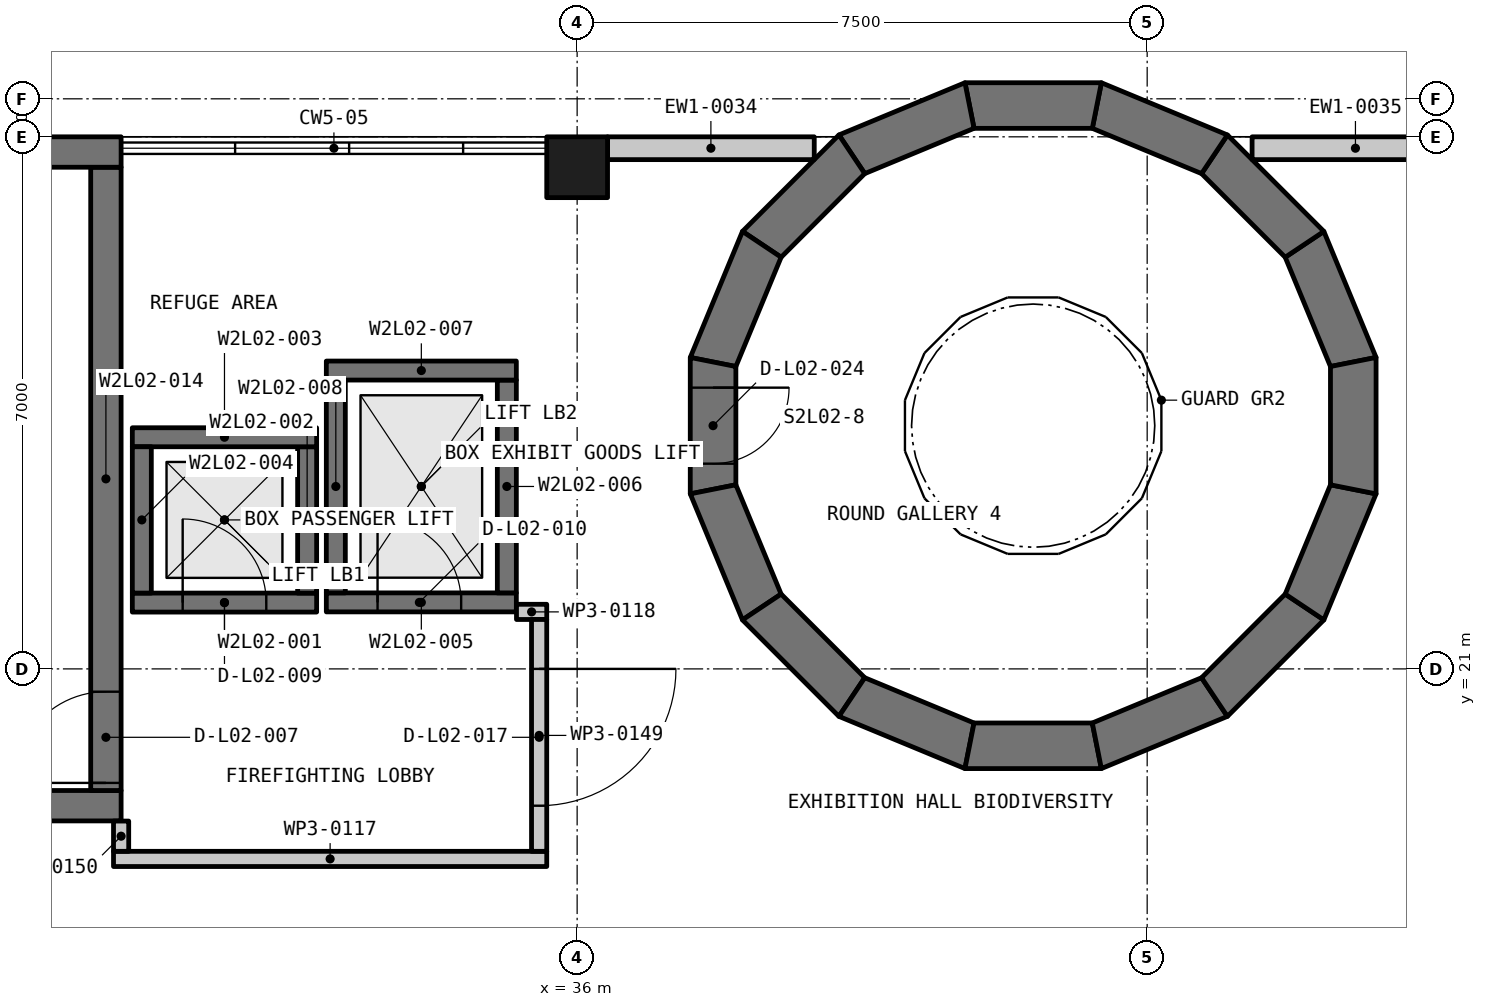
"""IFC4 building model, lengths in metres.
Left out: names, types, materials, properties, quantities, classifications, styles, units other than length and angle.
Written with IfcOpenShell. Run it as: python <this file> out.ifc"""

import sys

from ifc_helpers import new_model, si_unit, direction, frame, frame_2d, origin, origin_2d, place, context, subcontext, project, spatial, polyline, rectangle, outline, extrude, element, fill, save


model = new_model("IFC4")
c1 = context("Model", 3, precision=1e-05, world=origin(), true_north=direction((0.0, 1.0)))
c2 = subcontext(c1, "Body", "Model", "MODEL_VIEW")
j1 = project(units=[si_unit("LENGTHUNIT", "METRE"), si_unit("PLANEANGLEUNIT", "RADIAN")], contexts=[c1])
p1 = place(None, origin())
s1 = spatial("IfcSite", under=j1, at=p1, CompositionType="ELEMENT")
p2 = place(p1, origin())
s2 = spatial("IfcBuilding", under=s1, at=p2, CompositionType="ELEMENT")
p3 = place(p2, frame((0.0, 0.0, 11.25)))
s3 = spatial("IfcBuildingStorey", under=s2, at=p3, CompositionType="ELEMENT", Elevation=11.25)
p4 = place(p3, frame((36.0, 27.6, -0.3), z_axis=(0.0, 0.0, 1.0), x_axis=(1.0, 0.0, 0.0)))
e1 = element("IfcColumn", 1, at=p4, inside=s3, PredefinedType="COLUMN", context=c2, shape_type="SweptSolid", body=[
    extrude(rectangle(XDim=0.8, YDim=0.8, at=origin_2d()), origin(), (0.0, 0.0, 1.0), 4.16),
])
p5 = place(p3, frame((46.234, 24.983, -0.3), z_axis=(0.0, 0.0, 1.0), x_axis=(-0.3826441282, 0.92389581185, 0.0)))
e2 = element("IfcWall", 2, at=p5, inside=s3, PredefinedType="SHEAR", context=c2, shape_type="SweptSolid", body=[
    extrude(outline(polyline([(0.0, -0.3), (1.795, -0.3), (1.675, 0.3), (0.119, 0.3), (0.0, -0.3)])), origin(), (0.0, 0.0, 1.0), 4.5),
])
p6 = place(p3, frame((45.613, 26.543, -0.3), z_axis=(0.0, 0.0, 1.0), x_axis=(-0.707038767261, 0.707174788571, 0.0)))
e3 = element("IfcWall", 3, at=p6, inside=s3, PredefinedType="SHEAR", context=c2, shape_type="SweptSolid", body=[
    extrude(outline(polyline([(0.0, -0.3), (1.795, -0.3), (1.675, 0.3), (0.119, 0.3), (0.0, -0.3)])), origin(), (0.0, 0.0, 1.0), 4.5),
])
p7 = place(p3, frame((44.441, 27.748, -0.3), z_axis=(0.0, 0.0, 1.0), x_axis=(-0.923847718321, 0.382760229587, 0.0)))
e4 = element("IfcWall", 4, at=p7, inside=s3, PredefinedType="SHEAR", context=c2, shape_type="SweptSolid", body=[
    extrude(outline(polyline([(0.0, -0.3), (1.795, -0.3), (1.676, 0.3), (0.119, 0.3), (0.0, -0.3)])), origin(), (0.0, 0.0, 1.0), 4.5),
])
p8 = place(p3, frame((42.897, 28.412, -0.3), z_axis=(0.0, 0.0, 1.0), x_axis=(-1.0, 0.0, 0.0)))
e5 = element("IfcWall", 5, at=p8, inside=s3, PredefinedType="SHEAR", context=c2, shape_type="SweptSolid", body=[
    extrude(outline(polyline([(0.0, -0.3), (1.795, -0.3), (1.676, 0.3), (0.119, 0.3), (0.0, -0.3)])), origin(), (0.0, 0.0, 1.0), 4.5),
])
p9 = place(p3, frame((41.217, 28.435, -0.3), z_axis=(0.0, 0.0, 1.0), x_axis=(-0.923847718321, -0.382760229587, 0.0)))
e6 = element("IfcWall", 6, at=p9, inside=s3, PredefinedType="SHEAR", context=c2, shape_type="SweptSolid", body=[
    extrude(outline(polyline([(0.0, -0.3), (1.795, -0.3), (1.676, 0.3), (0.119, 0.3), (0.0, -0.3)])), origin(), (0.0, 0.0, 1.0), 4.5),
])
p10 = place(p3, frame((39.656, 27.813, -0.3), z_axis=(0.0, 0.0, 1.0), x_axis=(-0.707038767261, -0.707174788571, 0.0)))
e7 = element("IfcWall", 7, at=p10, inside=s3, PredefinedType="SHEAR", context=c2, shape_type="SweptSolid", body=[
    extrude(outline(polyline([(0.0, -0.3), (1.795, -0.3), (1.676, 0.3), (0.119, 0.3), (0.0, -0.3)])), origin(), (0.0, 0.0, 1.0), 4.5),
])
p11 = place(p3, frame((38.452, 26.641, -0.3), z_axis=(0.0, 0.0, 1.0), x_axis=(-0.3826441282, -0.92389581185, 0.0)))
e8 = element("IfcWall", 8, at=p11, inside=s3, PredefinedType="SHEAR", context=c2, shape_type="SweptSolid", body=[
    extrude(outline(polyline([(0.0, -0.3), (1.795, -0.3), (1.676, 0.3), (0.119, 0.3), (0.0, -0.3)])), origin(), (0.0, 0.0, 1.0), 4.5),
])
p12 = place(p3, frame((37.788, 25.097, -0.3), z_axis=(0.0, 0.0, 1.0), x_axis=(0.0, -1.0, 0.0)))
e9 = element("IfcWall", 9, at=p12, inside=s3, PredefinedType="SHEAR", context=c2, shape_type="SweptSolid", body=[
    extrude(outline(polyline([(0.0, -0.3), (1.795, -0.3), (1.676, 0.3), (0.119, 0.3), (0.0, -0.3)])), origin(), (0.0, 0.0, 1.0), 4.5),
])
p13 = place(p12, frame((0.397, 0.0, 0.3)))
e10 = element("IfcOpeningElement", 10, at=p13, cuts=e9, PredefinedType="OPENING", context=c2, shape_type="SweptSolid", body=[
    extrude(rectangle(XDim=1.0, YDim=2.2, at=frame_2d((0.5, 1.1))), frame((0.0, 0.31, 0.0), z_axis=(0.0, -1.0, 0.0), x_axis=(1.0, 0.0, 0.0)), (0.0, 0.0, 1.0), 0.62),
])
p14 = place(p3, frame((37.766, 23.417, -0.3), z_axis=(0.0, 0.0, 1.0), x_axis=(0.3826441282, -0.92389581185, 0.0)))
e11 = element("IfcWall", 11, at=p14, inside=s3, PredefinedType="SHEAR", context=c2, shape_type="SweptSolid", body=[
    extrude(outline(polyline([(0.0, -0.3), (1.795, -0.3), (1.676, 0.3), (0.119, 0.3), (0.0, -0.3)])), origin(), (0.0, 0.0, 1.0), 4.5),
])
p15 = place(p3, frame((38.387, 21.856, -0.3), z_axis=(0.0, 0.0, 1.0), x_axis=(0.707106781187, -0.707106781187, 0.0)))
e12 = element("IfcWall", 12, at=p15, inside=s3, PredefinedType="SHEAR", context=c2, shape_type="SweptSolid", body=[
    extrude(outline(polyline([(0.0, -0.3), (1.795, -0.3), (1.675, 0.3), (0.119, 0.3), (0.0, -0.3)])), origin(), (0.0, 0.0, 1.0), 4.5),
])
for number, where, z_axis, x_axis in (
    (13, (39.559, 20.652, -0.3), (0.0, 0.0, 1.0), (0.924, -0.383, 0.0)),
    (14, (41.103, 19.988, -0.3), (0.0, 0.0, 1.0), (1.0, 0.0, 0.0)),
):
    element("IfcWall", number, at=place(p3, frame(where, z_axis=z_axis, x_axis=x_axis)), inside=s3, PredefinedType="SHEAR", context=c2, shape_type="SweptSolid", body=[
        extrude(outline(polyline([(0.0, -0.3), (1.795, -0.3), (1.676, 0.3), (0.119, 0.3), (0.0, -0.3)])), origin(), (0.0, 0.0, 1.0), 4.5),
    ])
p16 = place(p3, frame((42.783, 19.966, -0.3), z_axis=(0.0, 0.0, 1.0), x_axis=(0.92389581185, 0.3826441282, 0.0)))
e15 = element("IfcWall", 15, at=p16, inside=s3, PredefinedType="SHEAR", context=c2, shape_type="SweptSolid", body=[
    extrude(outline(polyline([(0.0, -0.3), (1.795, -0.3), (1.675, 0.3), (0.119, 0.3), (0.0, -0.3)])), origin(), (0.0, 0.0, 1.0), 4.5),
])
p17 = place(p3, frame((44.344, 20.587, -0.3), z_axis=(0.0, 0.0, 1.0), x_axis=(0.707106781187, 0.707106781187, 0.0)))
e16 = element("IfcWall", 16, at=p17, inside=s3, PredefinedType="SHEAR", context=c2, shape_type="SweptSolid", body=[
    extrude(outline(polyline([(0.0, -0.3), (1.795, -0.3), (1.675, 0.3), (0.119, 0.3), (0.0, -0.3)])), origin(), (0.0, 0.0, 1.0), 4.5),
])
p18 = place(p3, frame((45.548, 21.759, -0.3), z_axis=(0.0, 0.0, 1.0), x_axis=(0.3826441282, 0.92389581185, 0.0)))
e17 = element("IfcWall", 17, at=p18, inside=s3, PredefinedType="SHEAR", context=c2, shape_type="SweptSolid", body=[
    extrude(outline(polyline([(-0.0, -0.3), (1.795, -0.3), (1.675, 0.3), (0.119, 0.3), (-0.0, -0.3)])), origin(), (0.0, 0.0, 1.0), 4.5),
])
p19 = place(p3, frame((46.212, 23.302, -0.3), z_axis=(0.0, 0.0, 1.0), x_axis=(0.0, 1.0, 0.0)))
e18 = element("IfcWall", 18, at=p19, inside=s3, PredefinedType="SHEAR", context=c2, shape_type="SweptSolid", body=[
    extrude(outline(polyline([(0.0, -0.3), (1.795, -0.3), (1.676, 0.3), (0.119, 0.3), (0.0, -0.3)])), origin(), (0.0, 0.0, 1.0), 4.5),
])
p20 = place(p3, frame((30.147, 21.873, -0.3), z_axis=(0.0, 0.0, 1.0), x_axis=(1.0, 0.0, 0.0)))
e19 = element("IfcWall", 19, at=p20, inside=s3, PredefinedType="SHEAR", context=c2, shape_type="SweptSolid", body=[
    extrude(rectangle(XDim=2.425, YDim=0.25, at=frame_2d((1.212, 0.0))), origin(), (0.0, 0.0, 1.0), 4.5),
])
p21 = place(p20, frame((0.663, 0.0, 0.3)))
e20 = element("IfcOpeningElement", 20, at=p21, cuts=e19, PredefinedType="OPENING", context=c2, shape_type="SweptSolid", body=[
    extrude(rectangle(XDim=1.1, YDim=2.1, at=frame_2d((0.55, 1.05))), frame((0.0, 0.135, 0.0), z_axis=(0.0, -1.0, 0.0), x_axis=(1.0, 0.0, 0.0)), (0.0, 0.0, 1.0), 0.27),
])
p22 = place(p3, frame((32.448, 21.998, -0.3), z_axis=(0.0, 0.0, 1.0), x_axis=(0.0, 1.0, 0.0)))
e21 = element("IfcWall", 21, at=p22, inside=s3, PredefinedType="SHEAR", context=c2, shape_type="SweptSolid", body=[
    extrude(rectangle(XDim=1.925, YDim=0.25, at=frame_2d((0.962, 0.0))), origin(), (0.0, 0.0, 1.0), 4.5),
])
p23 = place(p3, frame((30.147, 24.048, -0.3), z_axis=(0.0, 0.0, 1.0), x_axis=(1.0, 0.0, 0.0)))
e22 = element("IfcWall", 22, at=p23, inside=s3, PredefinedType="SHEAR", context=c2, shape_type="SweptSolid", body=[
    extrude(rectangle(XDim=2.425, YDim=0.25, at=frame_2d((1.212, 0.0))), origin(), (0.0, 0.0, 1.0), 4.5),
])
p24 = place(p3, frame((30.272, 21.998, -0.3), z_axis=(0.0, 0.0, 1.0), x_axis=(0.0, 1.0, 0.0)))
e23 = element("IfcWall", 23, at=p24, inside=s3, PredefinedType="SHEAR", context=c2, shape_type="SweptSolid", body=[
    extrude(rectangle(XDim=1.925, YDim=0.25, at=frame_2d((0.962, 0.0))), origin(), (0.0, 0.0, 1.0), 4.5),
])
p25 = place(p3, frame((32.7, 21.875, -0.3), z_axis=(0.0, 0.0, 1.0), x_axis=(1.0, 0.0, 0.0)))
e24 = element("IfcWall", 24, at=p25, inside=s3, PredefinedType="SHEAR", context=c2, shape_type="SweptSolid", body=[
    extrude(rectangle(XDim=2.5, YDim=0.25, at=frame_2d((1.25, 0.0))), origin(), (0.0, 0.0, 1.0), 4.5),
])
p26 = place(p25, frame((0.674, 0.0, 0.3)))
e25 = element("IfcOpeningElement", 25, at=p26, cuts=e24, PredefinedType="OPENING", context=c2, shape_type="SweptSolid", body=[
    extrude(rectangle(XDim=1.1, YDim=2.1, at=frame_2d((0.55, 1.05))), frame((0.0, 0.135, 0.0), z_axis=(0.0, -1.0, 0.0), x_axis=(1.0, 0.0, 0.0)), (0.0, 0.0, 1.0), 0.27),
])
p27 = place(p3, frame((35.075, 22.0, -0.3), z_axis=(0.0, 0.0, 1.0), x_axis=(0.0, 1.0, 0.0)))
e26 = element("IfcWall", 26, at=p27, inside=s3, PredefinedType="SHEAR", context=c2, shape_type="SweptSolid", body=[
    extrude(rectangle(XDim=2.8, YDim=0.25, at=frame_2d((1.4, 0.0))), origin(), (0.0, 0.0, 1.0), 4.5),
])
p28 = place(p3, frame((32.7, 24.925, -0.3), z_axis=(0.0, 0.0, 1.0), x_axis=(1.0, 0.0, 0.0)))
e27 = element("IfcWall", 27, at=p28, inside=s3, PredefinedType="SHEAR", context=c2, shape_type="SweptSolid", body=[
    extrude(rectangle(XDim=2.5, YDim=0.25, at=frame_2d((1.25, 0.0))), origin(), (0.0, 0.0, 1.0), 4.5),
])
p29 = place(p3, frame((32.825, 22.0, -0.3), z_axis=(0.0, 0.0, 1.0), x_axis=(0.0, 1.0, 0.0)))
e28 = element("IfcWall", 28, at=p29, inside=s3, PredefinedType="SHEAR", context=c2, shape_type="SweptSolid", body=[
    extrude(rectangle(XDim=2.8, YDim=0.25, at=frame_2d((1.4, 0.0))), origin(), (0.0, 0.0, 1.0), 4.5),
])
p30 = place(p3, frame((24.5, 19.2, -0.3), z_axis=(0.0, 0.0, 1.0), x_axis=(1.0, 0.0, 0.0)))
e29 = element("IfcWall", 29, at=p30, inside=s3, PredefinedType="SHEAR", context=c2, shape_type="SweptSolid", body=[
    extrude(rectangle(XDim=5.5, YDim=0.4, at=frame_2d((2.75, 0.0))), origin(), (0.0, 0.0, 1.0), 4.5),
])
p31 = place(p3, frame((29.8, 19.4, -0.3), z_axis=(0.0, 0.0, 1.0), x_axis=(0.0, 1.0, 0.0)))
e30 = element("IfcWall", 30, at=p31, inside=s3, PredefinedType="SHEAR", context=c2, shape_type="SweptSolid", body=[
    extrude(rectangle(XDim=8.2, YDim=0.4, at=frame_2d((4.1, 0.0))), origin(), (0.0, 0.0, 1.0), 4.5),
])
p32 = place(p31, frame((0.1, 0.0, 0.3)))
e31 = element("IfcOpeningElement", 31, at=p32, cuts=e30, PredefinedType="OPENING", context=c2, shape_type="SweptSolid", body=[
    extrude(rectangle(XDim=1.2, YDim=2.2, at=frame_2d((0.6, 1.1))), frame((0.0, 0.21, 0.0), z_axis=(0.0, -1.0, 0.0), x_axis=(1.0, 0.0, 0.0)), (0.0, 0.0, 1.0), 0.42),
])
p33 = place(p3, frame((24.5, 27.8, -0.3), z_axis=(0.0, 0.0, 1.0), x_axis=(1.0, 0.0, 0.0)))
e32 = element("IfcWall", 32, at=p33, inside=s3, PredefinedType="SHEAR", context=c2, shape_type="SweptSolid", body=[
    extrude(rectangle(XDim=5.5, YDim=0.4, at=frame_2d((2.75, 0.0))), origin(), (0.0, 0.0, 1.0), 4.5),
])
for number, where, z_axis, x_axis in (
    (33, (36.4, 27.85, 0.0), (0.0, 0.0, 1.0), (1.0, 0.0, 0.0)),
    (34, (44.88, 27.85, 0.0), (0.0, 0.0, 1.0), (1.0, 0.0, 0.0)),
):
    element("IfcWall", number, at=place(p3, frame(where, z_axis=z_axis, x_axis=x_axis)), inside=s3, PredefinedType="SOLIDWALL", context=c2, shape_type="SweptSolid", body=[
        extrude(rectangle(XDim=2.72, YDim=0.3, at=frame_2d((1.36, 0.0))), origin(), (0.0, 0.0, 1.0), 3.86),
    ])
p34 = place(p3, frame((29.9, 18.5, 0.0), z_axis=(0.0, 0.0, 1.0), x_axis=(1.0, 0.0, 0.0)))
e35 = element("IfcWall", 35, at=p34, inside=s3, PredefinedType="PARTITIONING", context=c2, shape_type="SweptSolid", body=[
    extrude(rectangle(XDim=5.7, YDim=0.2, at=frame_2d((2.85, 0.0))), origin(), (0.0, 0.0, 1.0), 4.35),
])
p35 = place(p3, frame((35.202, 21.75, 0.0), z_axis=(0.0, 0.0, 1.0), x_axis=(1.0, 0.0, 0.0)))
e36 = element("IfcWall", 36, at=p35, inside=s3, PredefinedType="PARTITIONING", context=c2, shape_type="SweptSolid", body=[
    extrude(rectangle(XDim=0.398, YDim=0.2, at=frame_2d((0.199, 0.0))), origin(), (0.0, 0.0, 1.0), 4.35),
])
p36 = place(p3, frame((35.5, 21.65, 0.0), z_axis=(0.0, 0.0, 1.0), x_axis=(0.0, -1.0, 0.0)))
e37 = element("IfcWall", 37, at=p36, inside=s3, PredefinedType="PARTITIONING", context=c2, shape_type="SweptSolid", body=[
    extrude(rectangle(XDim=3.05, YDim=0.2, at=frame_2d((1.525, 0.0))), origin(), (0.0, 0.0, 1.0), 4.35),
])
p37 = place(p36, frame((0.65, 0.0, 0.0)))
e38 = element("IfcOpeningElement", 38, at=p37, cuts=e37, PredefinedType="OPENING", context=c2, shape_type="SweptSolid", body=[
    extrude(rectangle(XDim=1.8, YDim=2.1, at=frame_2d((0.9, 1.05))), frame((0.0, 0.11, 0.0), z_axis=(0.0, -1.0, 0.0), x_axis=(1.0, 0.0, 0.0)), (0.0, 0.0, 1.0), 0.22),
])
p38 = place(p3, frame((30.0, 18.6, 0.0), z_axis=(0.0, 0.0, 1.0), x_axis=(0.0, 1.0, 0.0)))
e39 = element("IfcWall", 39, at=p38, inside=s3, PredefinedType="PARTITIONING", context=c2, shape_type="SweptSolid", body=[
    extrude(rectangle(XDim=0.398, YDim=0.2, at=frame_2d((0.199, 0.0))), origin(), (0.0, 0.0, 1.0), 4.35),
])
p39 = place(p32, origin())
e40 = element("IfcDoor", 40, at=p39, inside=s3, OperationType="SINGLE_SWING_RIGHT", PredefinedType="DOOR", context=c2, shape_type="SweptSolid", body=[
    extrude(rectangle(XDim=1.2, YDim=2.2, at=frame_2d((0.6, 1.1))), frame((0.0, 0.025, 0.0), z_axis=(0.0, -1.0, 0.0), x_axis=(1.0, 0.0, 0.0)), (0.0, 0.0, 1.0), 0.05),
])
fill(e31, e40)
p40 = place(p21, origin())
e41 = element("IfcDoor", 41, at=p40, inside=s3, OperationType="DOUBLE_DOOR_SLIDING", PredefinedType="DOOR", context=c2, shape_type="SweptSolid", body=[
    extrude(rectangle(XDim=1.1, YDim=2.1, at=frame_2d((0.55, 1.05))), frame((0.0, 0.025, 0.0), z_axis=(0.0, -1.0, 0.0), x_axis=(1.0, 0.0, 0.0)), (0.0, 0.0, 1.0), 0.05),
])
fill(e20, e41)
p41 = place(p26, origin())
e42 = element("IfcDoor", 42, at=p41, inside=s3, OperationType="DOUBLE_DOOR_SLIDING", PredefinedType="DOOR", context=c2, shape_type="SweptSolid", body=[
    extrude(rectangle(XDim=1.1, YDim=2.1, at=frame_2d((0.55, 1.05))), frame((0.0, 0.025, 0.0), z_axis=(0.0, -1.0, 0.0), x_axis=(1.0, 0.0, 0.0)), (0.0, 0.0, 1.0), 0.05),
])
fill(e25, e42)
p42 = place(p37, origin())
e43 = element("IfcDoor", 43, at=p42, inside=s3, OperationType="DOUBLE_DOOR_SINGLE_SWING", PredefinedType="DOOR", context=c2, shape_type="SweptSolid", body=[
    extrude(rectangle(XDim=1.8, YDim=2.1, at=frame_2d((0.9, 1.05))), frame((0.0, 0.025, 0.0), z_axis=(0.0, -1.0, 0.0), x_axis=(1.0, 0.0, 0.0)), (0.0, 0.0, 1.0), 0.05),
])
fill(e38, e43)
p43 = place(p13, origin())
e44 = element("IfcDoor", 44, at=p43, inside=s3, OperationType="SINGLE_SWING_LEFT", PredefinedType="DOOR", context=c2, shape_type="SweptSolid", body=[
    extrude(rectangle(XDim=1.0, YDim=2.2, at=frame_2d((0.5, 1.1))), frame((0.0, 0.025, 0.0), z_axis=(0.0, -1.0, 0.0), x_axis=(1.0, 0.0, 0.0)), (0.0, 0.0, 1.0), 0.05),
])
fill(e10, e44)
save(model, sys.argv[1])
